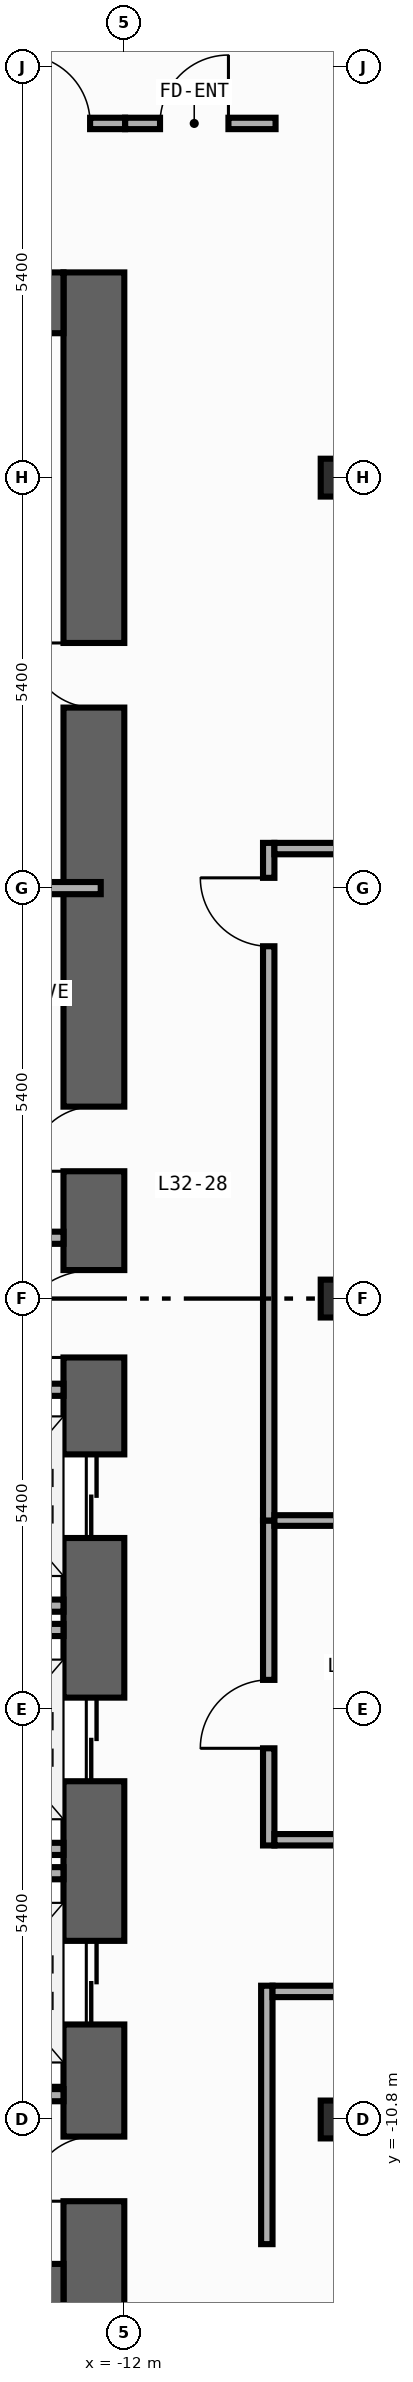
"""IFC4 building model, lengths in metres.
Left out: names, types, materials, properties, quantities, classifications, styles, units other than length and angle.
Written with IfcOpenShell. Run it as: python <this file> out.ifc"""

import sys

from ifc_helpers import new_model, si_unit, direction, frame, frame_2d, origin, origin_2d, place, context, subcontext, project, spatial, rectangle, i_section, extrude, element, fill, save


model = new_model("IFC4")
c1 = context("Model", 3, precision=1e-05, world=origin(), true_north=direction((0.0, 1.0)))
c2 = subcontext(c1, "Body", "Model", "MODEL_VIEW")
j1 = project(units=[si_unit("LENGTHUNIT", "METRE"), si_unit("PLANEANGLEUNIT", "RADIAN")], contexts=[c1])
p1 = place(None, origin())
s1 = spatial("IfcSite", under=j1, at=p1, CompositionType="ELEMENT")
p2 = place(p1, origin())
s2 = spatial("IfcBuilding", under=s1, at=p2, CompositionType="ELEMENT")
p3 = place(p2, frame((0.0, 0.0, 139.4)))
s3 = spatial("IfcBuildingStorey", under=s2, at=p3, CompositionType="ELEMENT", Elevation=139.4)
p4 = place(p3, frame((-12.4, -13.5, 0.0), z_axis=(0.0, 0.0, 1.0), x_axis=(0.0, 1.0, 0.0)))
e1 = element("IfcWall", 1, at=p4, inside=s3, PredefinedType="SHEAR", context=c2, shape_type="SweptSolid", body=[
    extrude(rectangle(XDim=27.0, YDim=0.8, at=frame_2d((13.5, 0.0))), origin(), (0.0, 0.0, 1.0), 3.94),
])
p5 = place(p4, frame((10.35, 0.0, 0.0)))
e2 = element("IfcOpeningElement", 2, at=p5, cuts=e1, PredefinedType="OPENING", context=c2, shape_type="SweptSolid", body=[
    extrude(rectangle(XDim=1.1, YDim=2.2, at=frame_2d((0.55, 1.1))), frame((0.0, 0.41, 0.0), z_axis=(0.0, -1.0, 0.0), x_axis=(1.0, 0.0, 0.0)), (0.0, 0.0, 1.0), 0.82),
])
p6 = place(p4, frame((7.15, 0.0, 0.0)))
e3 = element("IfcOpeningElement", 3, at=p6, cuts=e1, PredefinedType="OPENING", context=c2, shape_type="SweptSolid", body=[
    extrude(rectangle(XDim=1.1, YDim=2.2, at=frame_2d((0.55, 1.1))), frame((0.0, 0.41, 0.0), z_axis=(0.0, -1.0, 0.0), x_axis=(1.0, 0.0, 0.0)), (0.0, 0.0, 1.0), 0.82),
])
p7 = place(p4, frame((3.95, 0.0, 0.0)))
e4 = element("IfcOpeningElement", 4, at=p7, cuts=e1, PredefinedType="OPENING", context=c2, shape_type="SweptSolid", body=[
    extrude(rectangle(XDim=1.1, YDim=2.2, at=frame_2d((0.55, 1.1))), frame((0.0, 0.41, 0.0), z_axis=(0.0, -1.0, 0.0), x_axis=(1.0, 0.0, 0.0)), (0.0, 0.0, 1.0), 0.82),
])
p8 = place(p4, frame((15.175, 0.0, 0.0)))
e5 = element("IfcOpeningElement", 5, at=p8, cuts=e1, PredefinedType="OPENING", context=c2, shape_type="SweptSolid", body=[
    extrude(rectangle(XDim=0.85, YDim=2.1, at=frame_2d((0.425, 1.05))), frame((0.0, 0.41, 0.0), z_axis=(0.0, -1.0, 0.0), x_axis=(1.0, 0.0, 0.0)), (0.0, 0.0, 1.0), 0.82),
])
p9 = place(p4, frame((21.275, 0.0, 0.0)))
e6 = element("IfcOpeningElement", 6, at=p9, cuts=e1, PredefinedType="OPENING", context=c2, shape_type="SweptSolid", body=[
    extrude(rectangle(XDim=0.85, YDim=2.1, at=frame_2d((0.425, 1.05))), frame((0.0, 0.41, 0.0), z_axis=(0.0, -1.0, 0.0), x_axis=(1.0, 0.0, 0.0)), (0.0, 0.0, 1.0), 0.82),
])
p10 = place(p4, frame((12.725, 0.0, 0.0)))
e7 = element("IfcOpeningElement", 7, at=p10, cuts=e1, PredefinedType="OPENING", context=c2, shape_type="SweptSolid", body=[
    extrude(rectangle(XDim=1.15, YDim=2.2, at=frame_2d((0.575, 1.1))), frame((0.0, 0.41, 0.0), z_axis=(0.0, -1.0, 0.0), x_axis=(1.0, 0.0, 0.0)), (0.0, 0.0, 1.0), 0.82),
])
p11 = place(p4, frame((1.625, 0.0, 0.0)))
e8 = element("IfcOpeningElement", 8, at=p11, cuts=e1, PredefinedType="OPENING", context=c2, shape_type="SweptSolid", body=[
    extrude(rectangle(XDim=0.85, YDim=2.1, at=frame_2d((0.425, 1.05))), frame((0.0, 0.41, 0.0), z_axis=(0.0, -1.0, 0.0), x_axis=(1.0, 0.0, 0.0)), (0.0, 0.0, 1.0), 0.82),
])
for number, where, z_axis, x_axis in (
    (9, (-19.6, -13.1, 0.0), (0.0, 0.0, 1.0), (1.0, 0.0, 0.0)),
    (10, (-19.6, 13.1, 0.0), (0.0, 0.0, 1.0), (1.0, 0.0, 0.0)),
):
    element("IfcWall", number, at=place(p3, frame(where, z_axis=z_axis, x_axis=x_axis)), inside=s3, PredefinedType="SHEAR", context=c2, shape_type="SweptSolid", body=[
        extrude(rectangle(XDim=6.8, YDim=0.8, at=frame_2d((3.4, 0.0))), origin(), (0.0, 0.0, 1.0), 3.94),
    ])
for number, where, z_axis, x_axis in (
    (11, (-9.2, -10.8, 0.0), (0.0, 0.0, 1.0), (1.0, 0.0, 0.0)),
    (12, (-9.2, 0.0, 0.0), (0.0, 0.0, 1.0), (1.0, 0.0, 0.0)),
    (13, (-9.2, 10.8, 0.0), (0.0, 0.0, 1.0), (1.0, 0.0, 0.0)),
):
    element("IfcColumn", number, at=place(p3, frame(where, z_axis=z_axis, x_axis=x_axis)), inside=s3, PredefinedType="COLUMN", context=c2, shape_type="SweptSolid", body=[
        extrude(i_section(OverallWidth=0.432, OverallDepth=0.498, WebThickness=0.045, FlangeThickness=0.07, FilletRadius=0.022, at=origin_2d()), origin(), (0.0, 0.0, 1.0), 4.2),
    ])
for number, where, z_axis, x_axis in (
    (14, (-14.99, -4.04, 0.0), (0.0, 0.0, 1.0), (1.0, 0.0, 0.0)),
    (15, (-14.99, -7.24, 0.0), (0.0, 0.0, 1.0), (1.0, 0.0, 0.0)),
    (16, (-14.99, -4.36, 0.0), (0.0, 0.0, 1.0), (1.0, 0.0, 0.0)),
    (17, (-14.99, -7.56, 0.0), (0.0, 0.0, 1.0), (1.0, 0.0, 0.0)),
):
    element("IfcWall", number, at=place(p3, frame(where, z_axis=z_axis, x_axis=x_axis)), inside=s3, PredefinedType="STANDARD", context=c2, shape_type="SweptSolid", body=[
        extrude(rectangle(XDim=2.19, YDim=0.16, at=frame_2d((1.095, 0.0))), origin(), (0.0, 0.0, 1.0), 3.94),
    ])
for number, where, z_axis, x_axis in (
    (18, (-15.4, 0.8, 0.0), (0.0, 0.0, 1.0), (1.0, 0.0, 0.0)),
    (19, (-15.4, -1.2, 0.0), (0.0, 0.0, 1.0), (1.0, 0.0, 0.0)),
    (20, (-15.4, -10.48, 0.0), (0.0, 0.0, 1.0), (1.0, 0.0, 0.0)),
):
    element("IfcWall", number, at=place(p3, frame(where, z_axis=z_axis, x_axis=x_axis)), inside=s3, PredefinedType="STANDARD", context=c2, shape_type="SweptSolid", body=[
        extrude(rectangle(XDim=2.6, YDim=0.16, at=frame_2d((1.3, 0.0))), origin(), (0.0, 0.0, 1.0), 3.94),
    ])
p12 = place(p3, frame((-15.375, 5.4, 0.0), z_axis=(0.0, 0.0, 1.0), x_axis=(1.0, 0.0, 0.0)))
e21 = element("IfcWall", 21, at=p12, inside=s3, PredefinedType="PARTITIONING", context=c2, shape_type="SweptSolid", body=[
    extrude(rectangle(XDim=3.065, YDim=0.16, at=frame_2d((1.532, 0.0))), origin(), (0.0, 0.0, 1.0), 3.94),
])
p13 = place(p3, frame((-11.99, 15.46, 0.0), z_axis=(0.0, 0.0, 1.0), x_axis=(1.0, 0.0, 0.0)))
e22 = element("IfcWall", 22, at=p13, inside=s3, PredefinedType="PARTITIONING", context=c2, shape_type="SweptSolid", body=[
    extrude(rectangle(XDim=1.98, YDim=0.15, at=frame_2d((0.99, 0.0))), origin(), (0.0, 0.0, 1.0), 3.94),
])
p14 = place(p13, frame((0.46, 0.0, 0.0)))
e23 = element("IfcOpeningElement", 23, at=p14, cuts=e22, PredefinedType="OPENING", context=c2, shape_type="SweptSolid", body=[
    extrude(rectangle(XDim=0.9, YDim=2.15, at=frame_2d((0.45, 1.075))), frame((0.0, 0.085, 0.0), z_axis=(0.0, -1.0, 0.0), x_axis=(1.0, 0.0, 0.0)), (0.0, 0.0, 1.0), 0.17),
])
p15 = place(p3, frame((-10.1, -7.195, 0.0), z_axis=(0.0, 0.0, 1.0), x_axis=(0.0, 1.0, 0.0)))
e24 = element("IfcWall", 24, at=p15, inside=s3, PredefinedType="PARTITIONING", context=c2, shape_type="SweptSolid", body=[
    extrude(rectangle(XDim=4.275, YDim=0.15, at=frame_2d((2.138, 0.0))), origin(), (0.0, 0.0, 1.0), 3.94),
])
p16 = place(p15, frame((1.278, 0.0, 0.0)))
e25 = element("IfcOpeningElement", 25, at=p16, cuts=e24, PredefinedType="OPENING", context=c2, shape_type="SweptSolid", body=[
    extrude(rectangle(XDim=0.9, YDim=2.15, at=frame_2d((0.45, 1.075))), frame((0.0, 0.085, 0.0), z_axis=(0.0, -1.0, 0.0), x_axis=(1.0, 0.0, 0.0)), (0.0, 0.0, 1.0), 0.17),
])
p17 = place(p3, frame((-10.1, -2.92, 0.0), z_axis=(0.0, 0.0, 1.0), x_axis=(0.0, 1.0, 0.0)))
e26 = element("IfcWall", 26, at=p17, inside=s3, PredefinedType="PARTITIONING", context=c2, shape_type="SweptSolid", body=[
    extrude(rectangle(XDim=8.915, YDim=0.15, at=frame_2d((4.458, 0.0))), origin(), (0.0, 0.0, 1.0), 3.94),
])
p18 = place(p17, frame((7.555, 0.0, 0.0)))
e27 = element("IfcOpeningElement", 27, at=p18, cuts=e26, PredefinedType="OPENING", context=c2, shape_type="SweptSolid", body=[
    extrude(rectangle(XDim=0.9, YDim=2.15, at=frame_2d((0.45, 1.075))), frame((0.0, 0.085, 0.0), z_axis=(0.0, -1.0, 0.0), x_axis=(1.0, 0.0, 0.0)), (0.0, 0.0, 1.0), 0.17),
])
p19 = place(p3, frame((-10.125, -12.44, 0.0), z_axis=(0.0, 0.0, 1.0), x_axis=(0.0, 1.0, 0.0)))
e28 = element("IfcWall", 28, at=p19, inside=s3, PredefinedType="PARTITIONING", context=c2, shape_type="SweptSolid", body=[
    extrude(rectangle(XDim=3.4, YDim=0.15, at=frame_2d((1.7, 0.0))), origin(), (0.0, 0.0, 1.0), 3.94),
])
p20 = place(p3, frame((-10.025, 5.92, 0.0), z_axis=(0.0, 0.0, 1.0), x_axis=(1.0, 0.0, 0.0)))
e29 = element("IfcWall", 29, at=p20, inside=s3, PredefinedType="PARTITIONING", context=c2, shape_type="SweptSolid", body=[
    extrude(rectangle(XDim=8.82, YDim=0.15, at=frame_2d((4.41, 0.0))), origin(), (0.0, 0.0, 1.0), 3.94),
])
p21 = place(p20, frame((7.46, 0.0, 0.0)))
e30 = element("IfcOpeningElement", 30, at=p21, cuts=e29, PredefinedType="OPENING", context=c2, shape_type="SweptSolid", body=[
    extrude(rectangle(XDim=0.9, YDim=2.15, at=frame_2d((0.45, 1.075))), frame((0.0, 0.085, 0.0), z_axis=(0.0, -1.0, 0.0), x_axis=(1.0, 0.0, 0.0)), (0.0, 0.0, 1.0), 0.17),
])
p22 = place(p3, frame((-10.025, -7.12, 0.0), z_axis=(0.0, 0.0, 1.0), x_axis=(1.0, 0.0, 0.0)))
e31 = element("IfcWall", 31, at=p22, inside=s3, PredefinedType="PARTITIONING", context=c2, shape_type="SweptSolid", body=[
    extrude(rectangle(XDim=4.465, YDim=0.15, at=frame_2d((2.232, 0.0))), origin(), (0.0, 0.0, 1.0), 3.94),
])
p23 = place(p22, frame((3.105, 0.0, 0.0)))
e32 = element("IfcOpeningElement", 32, at=p23, cuts=e31, PredefinedType="OPENING", context=c2, shape_type="SweptSolid", body=[
    extrude(rectangle(XDim=0.9, YDim=2.15, at=frame_2d((0.45, 1.075))), frame((0.0, 0.085, 0.0), z_axis=(0.0, -1.0, 0.0), x_axis=(1.0, 0.0, 0.0)), (0.0, 0.0, 1.0), 0.17),
])
p24 = place(p3, frame((-10.05, -9.115, 0.0), z_axis=(0.0, 0.0, 1.0), x_axis=(1.0, 0.0, 0.0)))
e33 = element("IfcWall", 33, at=p24, inside=s3, PredefinedType="PARTITIONING", context=c2, shape_type="SweptSolid", body=[
    extrude(rectangle(XDim=8.265, YDim=0.15, at=frame_2d((4.133, 0.0))), origin(), (0.0, 0.0, 1.0), 3.94),
])
p25 = place(p24, frame((6.905, 0.0, 0.0)))
e34 = element("IfcOpeningElement", 34, at=p25, cuts=e33, PredefinedType="OPENING", context=c2, shape_type="SweptSolid", body=[
    extrude(rectangle(XDim=0.9, YDim=2.15, at=frame_2d((0.45, 1.075))), frame((0.0, 0.085, 0.0), z_axis=(0.0, -1.0, 0.0), x_axis=(1.0, 0.0, 0.0)), (0.0, 0.0, 1.0), 0.17),
])
p26 = place(p3, frame((-15.232, 15.46, 0.0), z_axis=(0.0, 0.0, 1.0), x_axis=(1.0, 0.0, 0.0)))
e35 = element("IfcWall", 35, at=p26, inside=s3, PredefinedType="PARTITIONING", context=c2, shape_type="SweptSolid", body=[
    extrude(rectangle(XDim=3.242, YDim=0.15, at=frame_2d((1.621, 0.0))), origin(), (0.0, 0.0, 1.0), 3.94),
])
p27 = place(p26, frame((1.882, 0.0, 0.0)))
e36 = element("IfcOpeningElement", 36, at=p27, cuts=e35, PredefinedType="OPENING", context=c2, shape_type="SweptSolid", body=[
    extrude(rectangle(XDim=0.9, YDim=2.15, at=frame_2d((0.45, 1.075))), frame((0.0, 0.085, 0.0), z_axis=(0.0, -1.0, 0.0), x_axis=(1.0, 0.0, 0.0)), (0.0, 0.0, 1.0), 0.17),
])
p28 = place(p3, frame((-10.025, -2.92, 0.0), z_axis=(0.0, 0.0, 1.0), x_axis=(1.0, 0.0, 0.0)))
e37 = element("IfcWall", 37, at=p28, inside=s3, PredefinedType="PARTITIONING", context=c2, shape_type="SweptSolid", body=[
    extrude(rectangle(XDim=4.465, YDim=0.14, at=frame_2d((2.232, 0.0))), origin(), (0.0, 0.0, 1.0), 3.94),
])
p29 = place(p5, origin())
e38 = element("IfcDoor", 38, at=p29, inside=s3, OperationType="DOUBLE_DOOR_SLIDING", PredefinedType="DOOR", context=c2, shape_type="SweptSolid", body=[
    extrude(rectangle(XDim=1.1, YDim=2.2, at=frame_2d((0.55, 1.1))), frame((0.0, 0.025, 0.0), z_axis=(0.0, -1.0, 0.0), x_axis=(1.0, 0.0, 0.0)), (0.0, 0.0, 1.0), 0.05),
])
fill(e2, e38)
p30 = place(p6, origin())
e39 = element("IfcDoor", 39, at=p30, inside=s3, OperationType="DOUBLE_DOOR_SLIDING", PredefinedType="DOOR", context=c2, shape_type="SweptSolid", body=[
    extrude(rectangle(XDim=1.1, YDim=2.2, at=frame_2d((0.55, 1.1))), frame((0.0, 0.025, 0.0), z_axis=(0.0, -1.0, 0.0), x_axis=(1.0, 0.0, 0.0)), (0.0, 0.0, 1.0), 0.05),
])
fill(e3, e39)
p31 = place(p7, origin())
e40 = element("IfcDoor", 40, at=p31, inside=s3, OperationType="DOUBLE_DOOR_SLIDING", PredefinedType="DOOR", context=c2, shape_type="SweptSolid", body=[
    extrude(rectangle(XDim=1.1, YDim=2.2, at=frame_2d((0.55, 1.1))), frame((0.0, 0.025, 0.0), z_axis=(0.0, -1.0, 0.0), x_axis=(1.0, 0.0, 0.0)), (0.0, 0.0, 1.0), 0.05),
])
fill(e4, e40)
p32 = place(p8, origin())
e41 = element("IfcDoor", 41, at=p32, inside=s3, OperationType="SINGLE_SWING_LEFT", PredefinedType="DOOR", context=c2, shape_type="SweptSolid", body=[
    extrude(rectangle(XDim=0.85, YDim=2.1, at=frame_2d((0.425, 1.05))), frame((0.0, 0.025, 0.0), z_axis=(0.0, -1.0, 0.0), x_axis=(1.0, 0.0, 0.0)), (0.0, 0.0, 1.0), 0.05),
])
fill(e5, e41)
p33 = place(p9, origin())
e42 = element("IfcDoor", 42, at=p33, inside=s3, OperationType="SINGLE_SWING_RIGHT", PredefinedType="DOOR", context=c2, shape_type="SweptSolid", body=[
    extrude(rectangle(XDim=0.85, YDim=2.1, at=frame_2d((0.425, 1.05))), frame((0.0, 0.025, 0.0), z_axis=(0.0, -1.0, 0.0), x_axis=(1.0, 0.0, 0.0)), (0.0, 0.0, 1.0), 0.05),
])
fill(e6, e42)
p34 = place(p10, origin())
e43 = element("IfcDoor", 43, at=p34, inside=s3, OperationType="SINGLE_SWING_LEFT", PredefinedType="DOOR", context=c2, shape_type="SweptSolid", body=[
    extrude(rectangle(XDim=1.15, YDim=2.2, at=frame_2d((0.575, 1.1))), frame((0.0, 0.025, 0.0), z_axis=(0.0, -1.0, 0.0), x_axis=(1.0, 0.0, 0.0)), (0.0, 0.0, 1.0), 0.05),
])
fill(e7, e43)
p35 = place(p11, origin())
e44 = element("IfcDoor", 44, at=p35, inside=s3, OperationType="SINGLE_SWING_LEFT", PredefinedType="DOOR", context=c2, shape_type="SweptSolid", body=[
    extrude(rectangle(XDim=0.85, YDim=2.1, at=frame_2d((0.425, 1.05))), frame((0.0, 0.025, 0.0), z_axis=(0.0, -1.0, 0.0), x_axis=(1.0, 0.0, 0.0)), (0.0, 0.0, 1.0), 0.05),
])
fill(e8, e44)
p36 = place(p14, origin())
e45 = element("IfcDoor", 45, at=p36, inside=s3, OperationType="SINGLE_SWING_RIGHT", PredefinedType="DOOR", context=c2, shape_type="SweptSolid", body=[
    extrude(rectangle(XDim=0.9, YDim=2.15, at=frame_2d((0.45, 1.075))), frame((0.0, 0.025, 0.0), z_axis=(0.0, -1.0, 0.0), x_axis=(1.0, 0.0, 0.0)), (0.0, 0.0, 1.0), 0.05),
])
fill(e23, e45)
p37 = place(p16, origin())
e46 = element("IfcDoor", 46, at=p37, inside=s3, OperationType="SINGLE_SWING_LEFT", PredefinedType="DOOR", context=c2, shape_type="SweptSolid", body=[
    extrude(rectangle(XDim=0.9, YDim=2.15, at=frame_2d((0.45, 1.075))), frame((0.0, 0.025, 0.0), z_axis=(0.0, -1.0, 0.0), x_axis=(1.0, 0.0, 0.0)), (0.0, 0.0, 1.0), 0.05),
])
fill(e25, e46)
p38 = place(p18, origin())
e47 = element("IfcDoor", 47, at=p38, inside=s3, OperationType="SINGLE_SWING_RIGHT", PredefinedType="DOOR", context=c2, shape_type="SweptSolid", body=[
    extrude(rectangle(XDim=0.9, YDim=2.15, at=frame_2d((0.45, 1.075))), frame((0.0, 0.025, 0.0), z_axis=(0.0, -1.0, 0.0), x_axis=(1.0, 0.0, 0.0)), (0.0, 0.0, 1.0), 0.05),
])
fill(e27, e47)
p39 = place(p27, origin())
e48 = element("IfcDoor", 48, at=p39, inside=s3, OperationType="SINGLE_SWING_LEFT", PredefinedType="DOOR", context=c2, shape_type="SweptSolid", body=[
    extrude(rectangle(XDim=0.9, YDim=2.15, at=frame_2d((0.45, 1.075))), frame((0.0, 0.025, 0.0), z_axis=(0.0, -1.0, 0.0), x_axis=(1.0, 0.0, 0.0)), (0.0, 0.0, 1.0), 0.05),
])
fill(e36, e48)
save(model, sys.argv[1])
